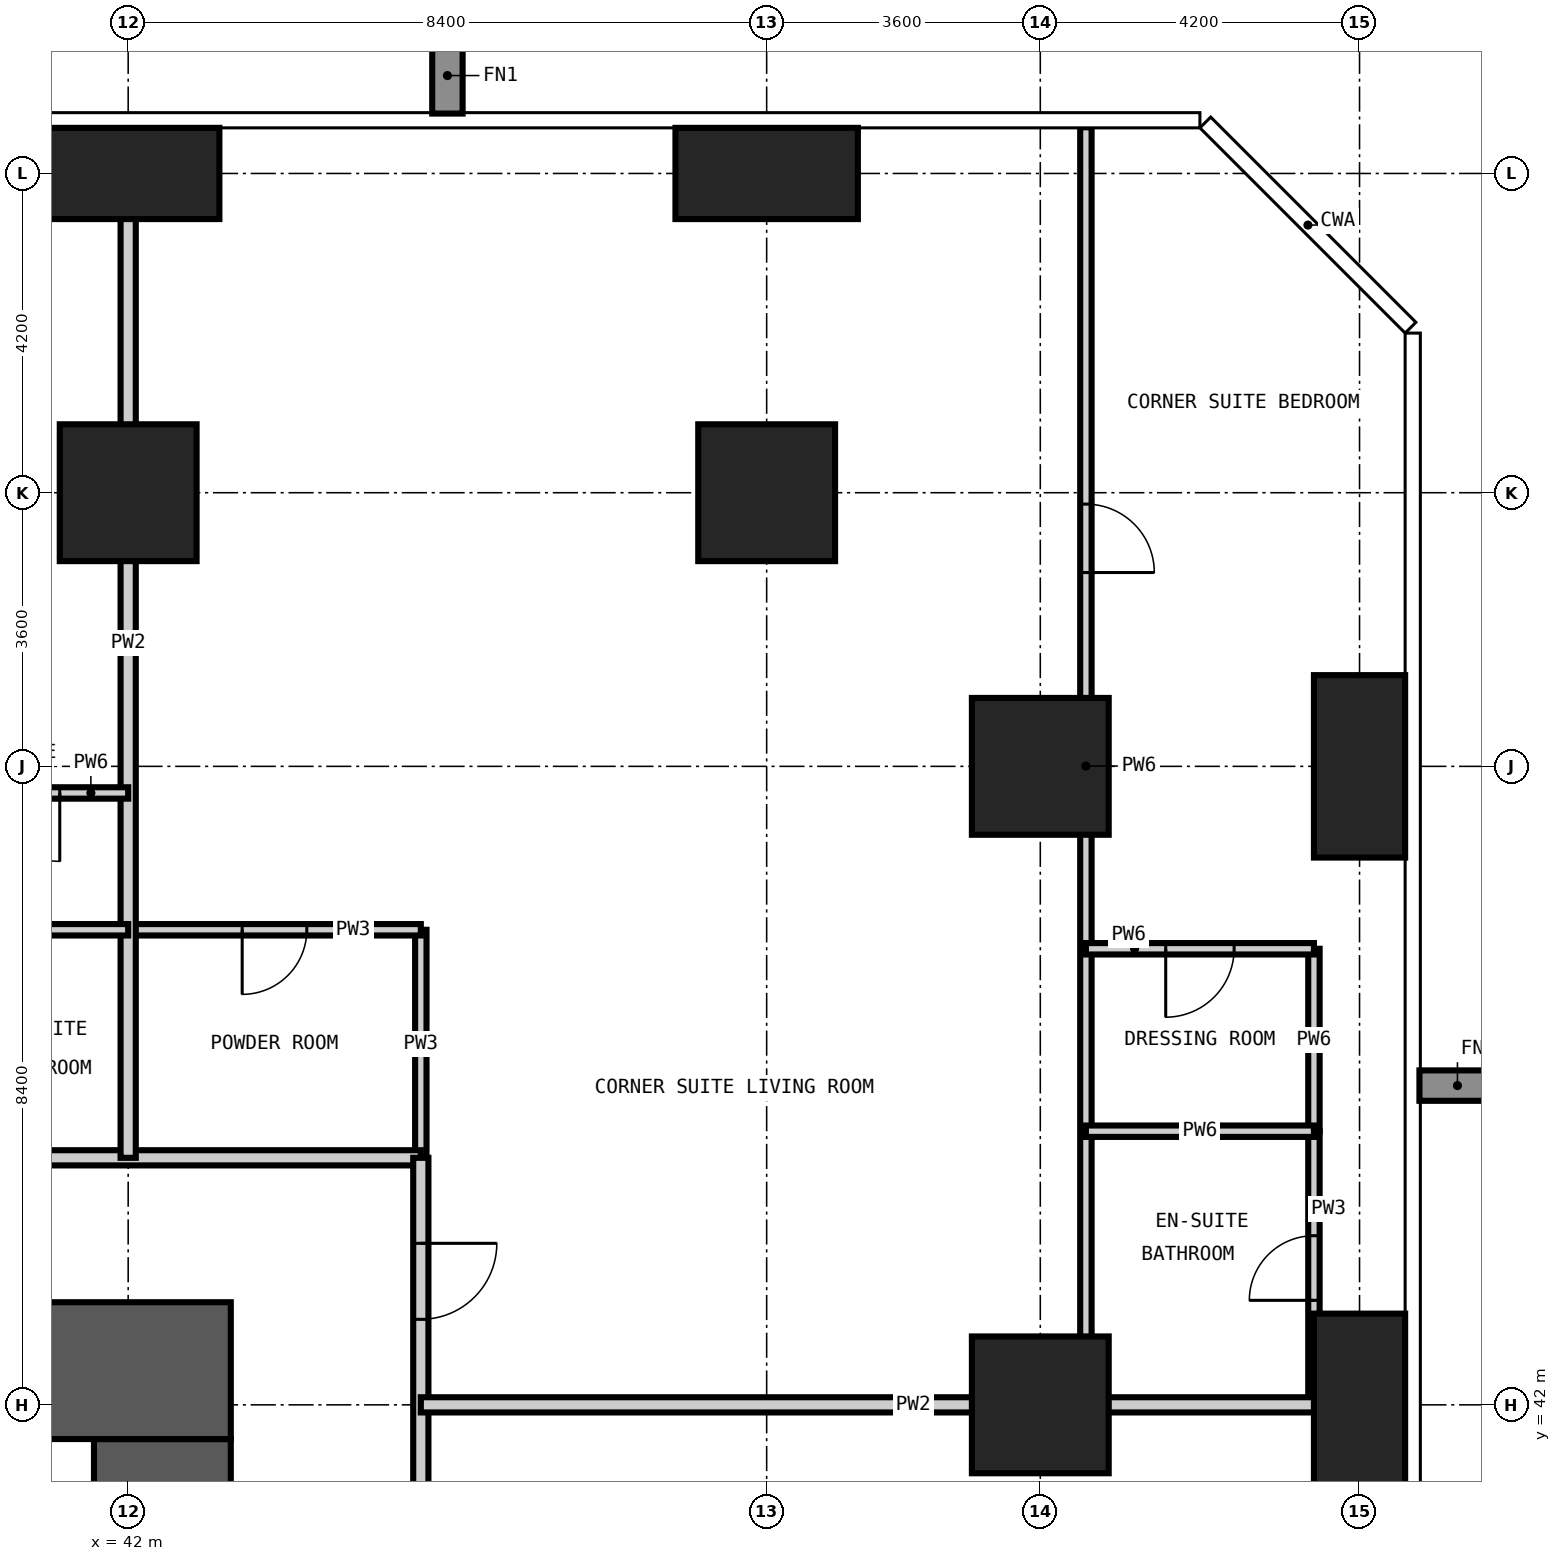
"""IFC4 building model, lengths in metres.
Left out: names, types, materials, properties, quantities, classifications, styles, units other than length and angle.
Written with IfcOpenShell. Run it as: python <this file> out.ifc"""

import sys

from ifc_helpers import new_model, si_unit, direction, frame, frame_2d, origin, origin_2d, place, context, subcontext, project, spatial, rectangle, extrude, element, fill, save


model = new_model("IFC4")
c1 = context("Model", 3, precision=1e-05, world=origin(), true_north=direction((0.0, 1.0)))
c2 = subcontext(c1, "Body", "Model", "MODEL_VIEW")
j1 = project(units=[si_unit("LENGTHUNIT", "METRE"), si_unit("PLANEANGLEUNIT", "RADIAN")], contexts=[c1])
p1 = place(None, origin())
s1 = spatial("IfcSite", under=j1, at=p1, CompositionType="ELEMENT")
p2 = place(p1, origin())
s2 = spatial("IfcBuilding", under=s1, at=p2, CompositionType="ELEMENT")
p3 = place(p2, frame((0.0, 0.0, 34.2)))
s3 = spatial("IfcBuildingStorey", under=s2, at=p3, CompositionType="ELEMENT", Elevation=34.2)
p4 = place(p3, frame((42.0, 54.0, -0.35), z_axis=(0.0, 0.0, 1.0), x_axis=(1.0, 0.0, 0.0)))
e1 = element("IfcColumn", 1, at=p4, inside=s3, PredefinedType="COLUMN", context=c2, shape_type="SweptSolid", body=[
    extrude(rectangle(XDim=1.8, YDim=1.8, at=origin_2d()), origin(), (0.0, 0.0, 1.0), 3.6),
])
p5 = place(p3, frame((42.0, 58.2, -0.35), z_axis=(0.0, 0.0, 1.0), x_axis=(1.0, 0.0, 0.0)))
e2 = element("IfcColumn", 2, at=p5, inside=s3, PredefinedType="COLUMN", context=c2, shape_type="SweptSolid", body=[
    extrude(rectangle(XDim=2.4, YDim=1.2, at=origin_2d()), origin(), (0.0, 0.0, 1.0), 3.6),
])
p6 = place(p3, frame((50.4, 54.0, -0.35), z_axis=(0.0, 0.0, 1.0), x_axis=(1.0, 0.0, 0.0)))
e3 = element("IfcColumn", 3, at=p6, inside=s3, PredefinedType="COLUMN", context=c2, shape_type="SweptSolid", body=[
    extrude(rectangle(XDim=1.8, YDim=1.8, at=origin_2d()), origin(), (0.0, 0.0, 1.0), 3.6),
])
p7 = place(p3, frame((50.4, 58.2, -0.35), z_axis=(0.0, 0.0, 1.0), x_axis=(1.0, 0.0, 0.0)))
e4 = element("IfcColumn", 4, at=p7, inside=s3, PredefinedType="COLUMN", context=c2, shape_type="SweptSolid", body=[
    extrude(rectangle(XDim=2.4, YDim=1.2, at=origin_2d()), origin(), (0.0, 0.0, 1.0), 3.6),
])
for number, where, z_axis, x_axis in (
    (5, (54.0, 42.0, -0.35), (0.0, 0.0, 1.0), (1.0, 0.0, 0.0)),
    (6, (54.0, 50.4, -0.35), (0.0, 0.0, 1.0), (1.0, 0.0, 0.0)),
):
    element("IfcColumn", number, at=place(p3, frame(where, z_axis=z_axis, x_axis=x_axis)), inside=s3, PredefinedType="COLUMN", context=c2, shape_type="SweptSolid", body=[
        extrude(rectangle(XDim=1.8, YDim=1.8, at=origin_2d()), origin(), (0.0, 0.0, 1.0), 3.6),
    ])
for number, where, z_axis, x_axis in (
    (7, (58.2, 42.0, -0.35), (0.0, 0.0, 1.0), (1.0, 0.0, 0.0)),
    (8, (58.2, 50.4, -0.35), (0.0, 0.0, 1.0), (1.0, 0.0, 0.0)),
):
    element("IfcColumn", number, at=place(p3, frame(where, z_axis=z_axis, x_axis=x_axis)), inside=s3, PredefinedType="COLUMN", context=c2, shape_type="SweptSolid", body=[
        extrude(rectangle(XDim=1.2, YDim=2.4, at=origin_2d()), origin(), (0.0, 0.0, 1.0), 3.6),
    ])
p8 = place(p3, frame((42.45, 17.25, -0.35), z_axis=(0.0, 0.0, 1.0), x_axis=(0.0, 1.0, 0.0)))
e9 = element("IfcWall", 9, at=p8, inside=s3, PredefinedType="SHEAR", context=c2, shape_type="SweptSolid", body=[
    extrude(rectangle(XDim=24.3, YDim=1.8, at=frame_2d((12.15, 0.0))), origin(), (0.0, 0.0, 1.0), 3.6),
])
p9 = place(p8, frame((0.35, 0.0, 0.35)))
e10 = element("IfcOpeningElement", 10, at=p9, cuts=e9, PredefinedType="OPENING", context=c2, shape_type="SweptSolid", body=[
    extrude(rectangle(XDim=1.2, YDim=2.2, at=frame_2d((0.6, 1.1))), frame((0.0, 0.91, 0.0), z_axis=(0.0, -1.0, 0.0), x_axis=(1.0, 0.0, 0.0)), (0.0, 0.0, 1.0), 1.82),
])
p10 = place(p8, frame((11.65, 0.0, 0.35)))
e11 = element("IfcOpeningElement", 11, at=p10, cuts=e9, PredefinedType="OPENING", context=c2, shape_type="SweptSolid", body=[
    extrude(rectangle(XDim=1.0, YDim=2.1, at=frame_2d((0.5, 1.05))), frame((0.0, 0.91, 0.0), z_axis=(0.0, -1.0, 0.0), x_axis=(1.0, 0.0, 0.0)), (0.0, 0.0, 1.0), 1.82),
])
p11 = place(p8, frame((20.05, 0.0, 0.35)))
e12 = element("IfcOpeningElement", 12, at=p11, cuts=e9, PredefinedType="OPENING", context=c2, shape_type="SweptSolid", body=[
    extrude(rectangle(XDim=1.0, YDim=2.1, at=frame_2d((0.5, 1.05))), frame((0.0, 0.91, 0.0), z_axis=(0.0, -1.0, 0.0), x_axis=(1.0, 0.0, 0.0)), (0.0, 0.0, 1.0), 1.82),
])
p12 = place(p3, frame((43.35, 42.45, -0.35), z_axis=(0.0, 0.0, 1.0), x_axis=(-1.0, 0.0, 0.0)))
e13 = element("IfcWall", 13, at=p12, inside=s3, PredefinedType="SHEAR", context=c2, shape_type="SweptSolid", body=[
    extrude(rectangle(XDim=27.9, YDim=1.8, at=frame_2d((13.95, 0.0))), origin(), (0.0, 0.0, 1.0), 3.6),
])
p13 = place(p12, frame((21.85, 0.0, 0.35)))
e14 = element("IfcOpeningElement", 14, at=p13, cuts=e13, PredefinedType="OPENING", context=c2, shape_type="SweptSolid", body=[
    extrude(rectangle(XDim=1.0, YDim=2.1, at=frame_2d((0.5, 1.05))), frame((0.0, 0.91, 0.0), z_axis=(0.0, -1.0, 0.0), x_axis=(1.0, 0.0, 0.0)), (0.0, 0.0, 1.0), 1.82),
])
p14 = place(p12, frame((11.25, 0.0, 0.35)))
e15 = element("IfcOpeningElement", 15, at=p14, cuts=e13, PredefinedType="OPENING", context=c2, shape_type="SweptSolid", body=[
    extrude(rectangle(XDim=1.2, YDim=2.2, at=frame_2d((0.6, 1.1))), frame((0.0, 0.91, 0.0), z_axis=(0.0, -1.0, 0.0), x_axis=(1.0, 0.0, 0.0)), (0.0, 0.0, 1.0), 1.82),
])
p15 = place(p3, frame((45.85, 45.25, 0.0), z_axis=(0.0, 0.0, 1.0), x_axis=(0.0, 1.0, 0.0)))
e16 = element("IfcWall", 16, at=p15, inside=s3, PredefinedType="PARTITIONING", context=c2, shape_type="SweptSolid", body=[
    extrude(rectangle(XDim=3.0, YDim=0.15, at=frame_2d((1.5, 0.0))), origin(), (0.0, 0.0, 1.0), 3.25),
])
p16 = place(p3, frame((57.6, 42.0, 0.0), z_axis=(0.0, 0.0, 1.0), x_axis=(0.0, 1.0, 0.0)))
e17 = element("IfcWall", 17, at=p16, inside=s3, PredefinedType="PARTITIONING", context=c2, shape_type="SweptSolid", body=[
    extrude(rectangle(XDim=3.6, YDim=0.15, at=frame_2d((1.8, 0.0))), origin(), (0.0, 0.0, 1.0), 3.25),
])
p17 = place(p16, frame((1.375, 0.0, 0.0)))
e18 = element("IfcOpeningElement", 18, at=p17, cuts=e17, PredefinedType="OPENING", context=c2, shape_type="SweptSolid", body=[
    extrude(rectangle(XDim=0.85, YDim=2.1, at=frame_2d((0.425, 1.05))), frame((0.0, 0.085, 0.0), z_axis=(0.0, -1.0, 0.0), x_axis=(1.0, 0.0, 0.0)), (0.0, 0.0, 1.0), 0.17),
])
p18 = place(p3, frame((42.0, 48.25, 0.0), z_axis=(0.0, 0.0, 1.0), x_axis=(1.0, 0.0, 0.0)))
e19 = element("IfcWall", 19, at=p18, inside=s3, PredefinedType="PARTITIONING", context=c2, shape_type="SweptSolid", body=[
    extrude(rectangle(XDim=3.85, YDim=0.15, at=frame_2d((1.925, 0.0))), origin(), (0.0, 0.0, 1.0), 3.25),
])
p19 = place(p18, frame((1.5, 0.0, 0.0)))
e20 = element("IfcOpeningElement", 20, at=p19, cuts=e19, PredefinedType="OPENING", context=c2, shape_type="SweptSolid", body=[
    extrude(rectangle(XDim=0.85, YDim=2.1, at=frame_2d((0.425, 1.05))), frame((0.0, 0.085, 0.0), z_axis=(0.0, -1.0, 0.0), x_axis=(1.0, 0.0, 0.0)), (0.0, 0.0, 1.0), 0.17),
])
p20 = place(p3, frame((13.25, 45.25, 0.0), z_axis=(0.0, 0.0, 1.0), x_axis=(1.0, 0.0, 0.0)))
e21 = element("IfcWall", 21, at=p20, inside=s3, PredefinedType="PARTITIONING", context=c2, shape_type="SweptSolid", body=[
    extrude(rectangle(XDim=32.6, YDim=0.2, at=frame_2d((16.3, 0.0))), origin(), (0.0, 0.0, 1.0), 3.25),
])
p21 = place(p20, frame((6.5, 0.0, 0.0)))
e22 = element("IfcOpeningElement", 22, at=p21, cuts=e21, PredefinedType="OPENING", context=c2, shape_type="SweptSolid", body=[
    extrude(rectangle(XDim=1.0, YDim=2.2, at=frame_2d((0.5, 1.1))), frame((0.0, 0.11, 0.0), z_axis=(0.0, -1.0, 0.0), x_axis=(1.0, 0.0, 0.0)), (0.0, 0.0, 1.0), 0.22),
])
p22 = place(p20, frame((11.45, 0.0, 0.0)))
e23 = element("IfcOpeningElement", 23, at=p22, cuts=e21, PredefinedType="OPENING", context=c2, shape_type="SweptSolid", body=[
    extrude(rectangle(XDim=1.0, YDim=2.2, at=frame_2d((0.5, 1.1))), frame((0.0, 0.11, 0.0), z_axis=(0.0, -1.0, 0.0), x_axis=(1.0, 0.0, 0.0)), (0.0, 0.0, 1.0), 0.22),
])
p23 = place(p20, frame((19.85, 0.0, 0.0)))
e24 = element("IfcOpeningElement", 24, at=p23, cuts=e21, PredefinedType="OPENING", context=c2, shape_type="SweptSolid", body=[
    extrude(rectangle(XDim=1.0, YDim=2.2, at=frame_2d((0.5, 1.1))), frame((0.0, 0.11, 0.0), z_axis=(0.0, -1.0, 0.0), x_axis=(1.0, 0.0, 0.0)), (0.0, 0.0, 1.0), 0.22),
])
p24 = place(p20, frame((24.8, 0.0, 0.0)))
e25 = element("IfcOpeningElement", 25, at=p24, cuts=e21, PredefinedType="OPENING", context=c2, shape_type="SweptSolid", body=[
    extrude(rectangle(XDim=1.0, YDim=2.2, at=frame_2d((0.5, 1.1))), frame((0.0, 0.11, 0.0), z_axis=(0.0, -1.0, 0.0), x_axis=(1.0, 0.0, 0.0)), (0.0, 0.0, 1.0), 0.22),
])
p25 = place(p3, frame((45.85, 45.25, 0.0), z_axis=(0.0, 0.0, 1.0), x_axis=(0.0, -1.0, 0.0)))
e26 = element("IfcWall", 26, at=p25, inside=s3, PredefinedType="PARTITIONING", context=c2, shape_type="SweptSolid", body=[
    extrude(rectangle(XDim=32.0, YDim=0.2, at=frame_2d((16.0, 0.0))), origin(), (0.0, 0.0, 1.0), 3.25),
])
p26 = place(p25, frame((23.75, 0.0, 0.0)))
e27 = element("IfcOpeningElement", 27, at=p26, cuts=e26, PredefinedType="OPENING", context=c2, shape_type="SweptSolid", body=[
    extrude(rectangle(XDim=1.0, YDim=2.2, at=frame_2d((0.5, 1.1))), frame((0.0, 0.11, 0.0), z_axis=(0.0, -1.0, 0.0), x_axis=(1.0, 0.0, 0.0)), (0.0, 0.0, 1.0), 0.22),
])
p27 = place(p25, frame((15.35, 0.0, 0.0)))
e28 = element("IfcOpeningElement", 28, at=p27, cuts=e26, PredefinedType="OPENING", context=c2, shape_type="SweptSolid", body=[
    extrude(rectangle(XDim=1.0, YDim=2.2, at=frame_2d((0.5, 1.1))), frame((0.0, 0.11, 0.0), z_axis=(0.0, -1.0, 0.0), x_axis=(1.0, 0.0, 0.0)), (0.0, 0.0, 1.0), 0.22),
])
p28 = place(p25, frame((6.95, 0.0, 0.0)))
e29 = element("IfcOpeningElement", 29, at=p28, cuts=e26, PredefinedType="OPENING", context=c2, shape_type="SweptSolid", body=[
    extrude(rectangle(XDim=1.0, YDim=2.2, at=frame_2d((0.5, 1.1))), frame((0.0, 0.11, 0.0), z_axis=(0.0, -1.0, 0.0), x_axis=(1.0, 0.0, 0.0)), (0.0, 0.0, 1.0), 0.22),
])
p29 = place(p25, frame((29.725, 0.0, 0.0)))
e30 = element("IfcOpeningElement", 30, at=p29, cuts=e26, PredefinedType="OPENING", context=c2, shape_type="SweptSolid", body=[
    extrude(rectangle(XDim=1.0, YDim=2.2, at=frame_2d((0.5, 1.1))), frame((0.0, 0.11, 0.0), z_axis=(0.0, -1.0, 0.0), x_axis=(1.0, 0.0, 0.0)), (0.0, 0.0, 1.0), 0.22),
])
p30 = place(p25, frame((1.125, 0.0, 0.0)))
e31 = element("IfcOpeningElement", 31, at=p30, cuts=e26, PredefinedType="OPENING", context=c2, shape_type="SweptSolid", body=[
    extrude(rectangle(XDim=1.0, YDim=2.2, at=frame_2d((0.5, 1.1))), frame((0.0, 0.11, 0.0), z_axis=(0.0, -1.0, 0.0), x_axis=(1.0, 0.0, 0.0)), (0.0, 0.0, 1.0), 0.22),
])
p31 = place(p3, frame((42.0, 45.25, 0.0), z_axis=(0.0, 0.0, 1.0), x_axis=(0.0, 1.0, 0.0)))
e32 = element("IfcWall", 32, at=p31, inside=s3, PredefinedType="PARTITIONING", context=c2, shape_type="SweptSolid", body=[
    extrude(rectangle(XDim=13.558, YDim=0.2, at=frame_2d((6.779, 0.0))), origin(), (0.0, 0.0, 1.0), 3.25),
])
p32 = place(p3, frame((45.85, 42.0, 0.0), z_axis=(0.0, 0.0, 1.0), x_axis=(1.0, 0.0, 0.0)))
e33 = element("IfcWall", 33, at=p32, inside=s3, PredefinedType="PARTITIONING", context=c2, shape_type="SweptSolid", body=[
    extrude(rectangle(XDim=12.958, YDim=0.2, at=frame_2d((6.479, 0.0))), origin(), (0.0, 0.0, 1.0), 3.25),
])
p33 = place(p3, frame((54.6, 42.0, 0.0), z_axis=(0.0, 0.0, 1.0), x_axis=(0.0, 1.0, 0.0)))
e34 = element("IfcWall", 34, at=p33, inside=s3, PredefinedType="PARTITIONING", context=c2, shape_type="SweptSolid", body=[
    extrude(rectangle(XDim=16.808, YDim=0.15, at=frame_2d((8.404, 0.0))), origin(), (0.0, 0.0, 1.0), 3.25),
])
p34 = place(p33, frame((10.95, 0.0, 0.0)))
e35 = element("IfcOpeningElement", 35, at=p34, cuts=e34, PredefinedType="OPENING", context=c2, shape_type="SweptSolid", body=[
    extrude(rectangle(XDim=0.9, YDim=2.1, at=frame_2d((0.45, 1.05))), frame((0.0, 0.085, 0.0), z_axis=(0.0, -1.0, 0.0), x_axis=(1.0, 0.0, 0.0)), (0.0, 0.0, 1.0), 0.17),
])
p35 = place(p3, frame((57.6, 45.6, 0.0), z_axis=(0.0, 0.0, 1.0), x_axis=(0.0, 1.0, 0.0)))
e36 = element("IfcWall", 36, at=p35, inside=s3, PredefinedType="PARTITIONING", context=c2, shape_type="SweptSolid", body=[
    extrude(rectangle(XDim=2.4, YDim=0.15, at=frame_2d((1.2, 0.0))), origin(), (0.0, 0.0, 1.0), 3.25),
])
p36 = place(p3, frame((54.6, 45.6, 0.0), z_axis=(0.0, 0.0, 1.0), x_axis=(1.0, 0.0, 0.0)))
e37 = element("IfcWall", 37, at=p36, inside=s3, PredefinedType="PARTITIONING", context=c2, shape_type="SweptSolid", body=[
    extrude(rectangle(XDim=3.0, YDim=0.15, at=frame_2d((1.5, 0.0))), origin(), (0.0, 0.0, 1.0), 3.25),
])
p37 = place(p3, frame((54.6, 48.0, 0.0), z_axis=(0.0, 0.0, 1.0), x_axis=(1.0, 0.0, 0.0)))
e38 = element("IfcWall", 38, at=p37, inside=s3, PredefinedType="PARTITIONING", context=c2, shape_type="SweptSolid", body=[
    extrude(rectangle(XDim=3.0, YDim=0.15, at=frame_2d((1.5, 0.0))), origin(), (0.0, 0.0, 1.0), 3.25),
])
p38 = place(p37, frame((1.05, 0.0, 0.0)))
e39 = element("IfcOpeningElement", 39, at=p38, cuts=e38, PredefinedType="OPENING", context=c2, shape_type="SweptSolid", body=[
    extrude(rectangle(XDim=0.9, YDim=2.1, at=frame_2d((0.45, 1.05))), frame((0.0, 0.085, 0.0), z_axis=(0.0, -1.0, 0.0), x_axis=(1.0, 0.0, 0.0)), (0.0, 0.0, 1.0), 0.17),
])
p39 = place(p3, frame((39.3, 48.25, 0.0), z_axis=(0.0, 0.0, 1.0), x_axis=(1.0, 0.0, 0.0)))
e40 = element("IfcWall", 40, at=p39, inside=s3, PredefinedType="PARTITIONING", context=c2, shape_type="SweptSolid", body=[
    extrude(rectangle(XDim=2.7, YDim=0.15, at=frame_2d((1.35, 0.0))), origin(), (0.0, 0.0, 1.0), 3.25),
])
p40 = place(p3, frame((39.3, 50.05, 0.0), z_axis=(0.0, 0.0, 1.0), x_axis=(1.0, 0.0, 0.0)))
e41 = element("IfcWall", 41, at=p40, inside=s3, PredefinedType="PARTITIONING", context=c2, shape_type="SweptSolid", body=[
    extrude(rectangle(XDim=2.7, YDim=0.15, at=frame_2d((1.35, 0.0))), origin(), (0.0, 0.0, 1.0), 3.25),
])
p41 = place(p40, frame((0.9, 0.0, 0.0)))
e42 = element("IfcOpeningElement", 42, at=p41, cuts=e41, PredefinedType="OPENING", context=c2, shape_type="SweptSolid", body=[
    extrude(rectangle(XDim=0.9, YDim=2.1, at=frame_2d((0.45, 1.05))), frame((0.0, 0.085, 0.0), z_axis=(0.0, -1.0, 0.0), x_axis=(1.0, 0.0, 0.0)), (0.0, 0.0, 1.0), 0.17),
])
p42 = place(p41, frame((0.9, 0.0, 0.0), z_axis=(0.0, 0.0, 1.0), x_axis=(-1.0, 0.0, 0.0)))
e43 = element("IfcDoor", 43, at=p42, inside=s3, OperationType="SINGLE_SWING_LEFT", PredefinedType="DOOR", context=c2, shape_type="SweptSolid", body=[
    extrude(rectangle(XDim=0.9, YDim=2.1, at=frame_2d((0.45, 1.05))), frame((0.0, 0.025, 0.0), z_axis=(0.0, -1.0, 0.0), x_axis=(1.0, 0.0, 0.0)), (0.0, 0.0, 1.0), 0.05),
])
fill(e42, e43)
p43 = place(p30, origin())
e44 = element("IfcDoor", 44, at=p43, inside=s3, OperationType="SINGLE_SWING_LEFT", PredefinedType="DOOR", context=c2, shape_type="SweptSolid", body=[
    extrude(rectangle(XDim=1.0, YDim=2.2, at=frame_2d((0.5, 1.1))), frame((0.0, 0.025, 0.0), z_axis=(0.0, -1.0, 0.0), x_axis=(1.0, 0.0, 0.0)), (0.0, 0.0, 1.0), 0.05),
])
fill(e31, e44)
p44 = place(p19, frame((0.85, 0.0, 0.0), z_axis=(0.0, 0.0, 1.0), x_axis=(-1.0, 0.0, 0.0)))
e45 = element("IfcDoor", 45, at=p44, inside=s3, OperationType="SINGLE_SWING_RIGHT", PredefinedType="DOOR", context=c2, shape_type="SweptSolid", body=[
    extrude(rectangle(XDim=0.85, YDim=2.1, at=frame_2d((0.425, 1.05))), frame((0.0, 0.025, 0.0), z_axis=(0.0, -1.0, 0.0), x_axis=(1.0, 0.0, 0.0)), (0.0, 0.0, 1.0), 0.05),
])
fill(e20, e45)
p45 = place(p34, frame((0.9, 0.0, 0.0), z_axis=(0.0, 0.0, 1.0), x_axis=(-1.0, 0.0, 0.0)))
e46 = element("IfcDoor", 46, at=p45, inside=s3, OperationType="SINGLE_SWING_RIGHT", PredefinedType="DOOR", context=c2, shape_type="SweptSolid", body=[
    extrude(rectangle(XDim=0.9, YDim=2.1, at=frame_2d((0.45, 1.05))), frame((0.0, 0.025, 0.0), z_axis=(0.0, -1.0, 0.0), x_axis=(1.0, 0.0, 0.0)), (0.0, 0.0, 1.0), 0.05),
])
fill(e35, e46)
p46 = place(p17, origin())
e47 = element("IfcDoor", 47, at=p46, inside=s3, OperationType="SINGLE_SWING_LEFT", PredefinedType="DOOR", context=c2, shape_type="SweptSolid", body=[
    extrude(rectangle(XDim=0.85, YDim=2.1, at=frame_2d((0.425, 1.05))), frame((0.0, 0.025, 0.0), z_axis=(0.0, -1.0, 0.0), x_axis=(1.0, 0.0, 0.0)), (0.0, 0.0, 1.0), 0.05),
])
fill(e18, e47)
p47 = place(p38, frame((0.9, 0.0, 0.0), z_axis=(0.0, 0.0, 1.0), x_axis=(-1.0, 0.0, 0.0)))
e48 = element("IfcDoor", 48, at=p47, inside=s3, OperationType="SINGLE_SWING_RIGHT", PredefinedType="DOOR", context=c2, shape_type="SweptSolid", body=[
    extrude(rectangle(XDim=0.9, YDim=2.1, at=frame_2d((0.45, 1.05))), frame((0.0, 0.025, 0.0), z_axis=(0.0, -1.0, 0.0), x_axis=(1.0, 0.0, 0.0)), (0.0, 0.0, 1.0), 0.05),
])
fill(e39, e48)
save(model, sys.argv[1])
